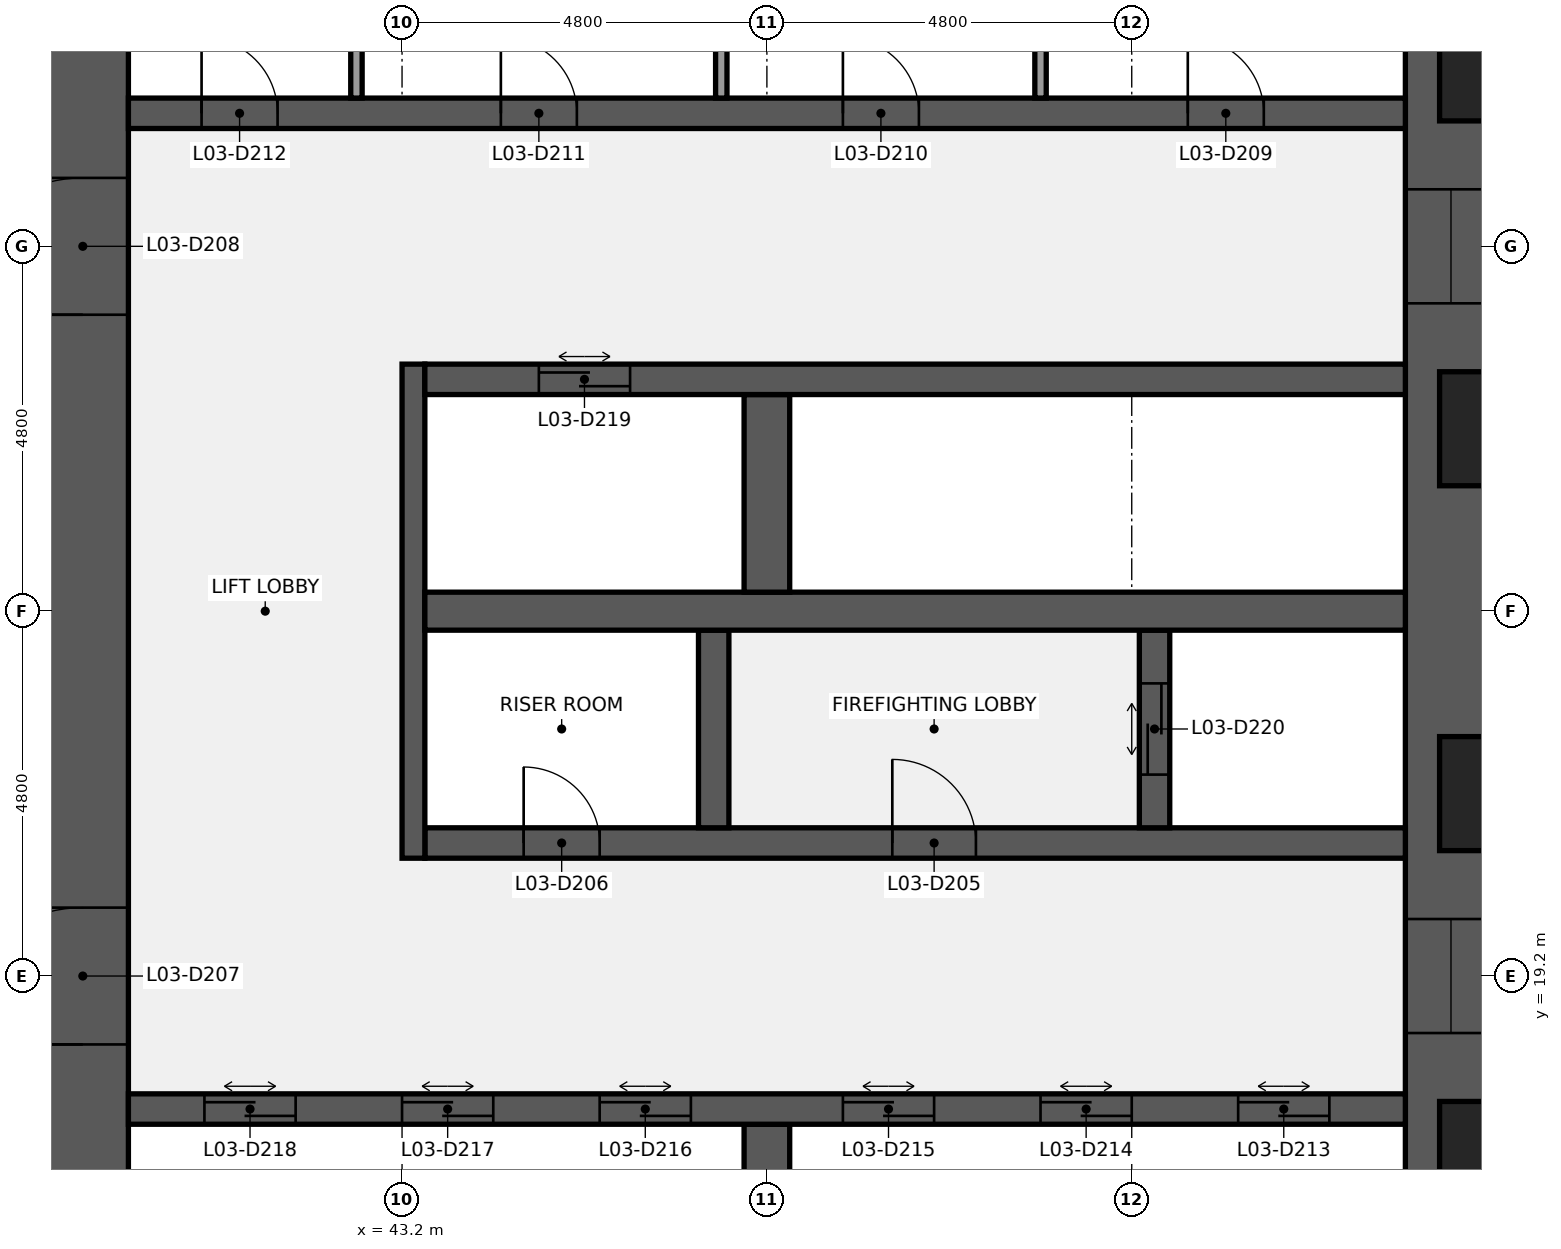
"""IFC4 building model, lengths in metres.
Left out: names, types, materials, properties, quantities, classifications, styles, units other than length and angle.
Written with IfcOpenShell. Run it as: python <this file> out.ifc"""

import sys

from ifc_helpers import new_model, si_unit, direction, frame, frame_2d, origin, place, context, subcontext, project, spatial, rectangle, extrude, element, fill, save


model = new_model("IFC4")
c1 = context("Model", 3, precision=1e-05, world=origin(), true_north=direction((0.0, 1.0)))
c2 = subcontext(c1, "Body", "Model", "MODEL_VIEW")
j1 = project(units=[si_unit("LENGTHUNIT", "METRE"), si_unit("PLANEANGLEUNIT", "RADIAN")], contexts=[c1])
p1 = place(None, origin())
s1 = spatial("IfcSite", under=j1, at=p1, CompositionType="ELEMENT")
p2 = place(p1, origin())
s2 = spatial("IfcBuilding", under=s1, at=p2, CompositionType="ELEMENT")
p3 = place(p2, frame((0.0, 0.0, 21.4)))
s3 = spatial("IfcBuildingStorey", under=s2, at=p3, CompositionType="ELEMENT", Elevation=21.4)
p4 = place(p3, frame((57.0, 38.4, 0.0), z_axis=(0.0, 0.0, 1.0), x_axis=(0.0, -1.0, 0.0)))
e1 = element("IfcWall", 1, at=p4, inside=s3, PredefinedType="SHEAR", context=c2, shape_type="SweptSolid", body=[
    extrude(rectangle(XDim=28.8, YDim=1.2, at=frame_2d((14.4, 0.0))), origin(), (0.0, 0.0, 1.0), 4.24),
])
p5 = place(p4, frame((18.45, 0.0, 0.9)))
e2 = element("IfcOpeningElement", 2, at=p5, cuts=e1, PredefinedType="OPENING", context=c2, shape_type="SweptSolid", body=[
    extrude(rectangle(XDim=1.5, YDim=1.5, at=frame_2d((0.75, 0.75))), frame((0.0, 0.61, 0.0), z_axis=(0.0, -1.0, 0.0), x_axis=(1.0, 0.0, 0.0)), (0.0, 0.0, 1.0), 1.22),
])
p6 = place(p4, frame((8.85, 0.0, 0.9)))
e3 = element("IfcOpeningElement", 3, at=p6, cuts=e1, PredefinedType="OPENING", context=c2, shape_type="SweptSolid", body=[
    extrude(rectangle(XDim=1.5, YDim=1.5, at=frame_2d((0.75, 0.75))), frame((0.0, 0.61, 0.0), z_axis=(0.0, -1.0, 0.0), x_axis=(1.0, 0.0, 0.0)), (0.0, 0.0, 1.0), 1.22),
])
p7 = place(p3, frame((39.0, 9.6, 0.0), z_axis=(0.0, 0.0, 1.0), x_axis=(0.0, 1.0, 0.0)))
e4 = element("IfcWall", 4, at=p7, inside=s3, PredefinedType="SHEAR", context=c2, shape_type="SweptSolid", body=[
    extrude(rectangle(XDim=28.8, YDim=1.2, at=frame_2d((14.4, 0.0))), origin(), (0.0, 0.0, 1.0), 4.24),
])
p8 = place(p7, frame((8.7, 0.0, 0.0)))
e5 = element("IfcOpeningElement", 5, at=p8, cuts=e4, PredefinedType="OPENING", context=c2, shape_type="SweptSolid", body=[
    extrude(rectangle(XDim=1.8, YDim=2.1, at=frame_2d((0.9, 1.05))), frame((0.0, 0.61, 0.0), z_axis=(0.0, -1.0, 0.0), x_axis=(1.0, 0.0, 0.0)), (0.0, 0.0, 1.0), 1.22),
])
p9 = place(p7, frame((18.3, 0.0, 0.0)))
e6 = element("IfcOpeningElement", 6, at=p9, cuts=e4, PredefinedType="OPENING", context=c2, shape_type="SweptSolid", body=[
    extrude(rectangle(XDim=1.8, YDim=2.1, at=frame_2d((0.9, 1.05))), frame((0.0, 0.61, 0.0), z_axis=(0.0, -1.0, 0.0), x_axis=(1.0, 0.0, 0.0)), (0.0, 0.0, 1.0), 1.22),
])
p10 = place(p3, frame((48.0, 14.65, 0.0), z_axis=(0.0, 0.0, 1.0), x_axis=(0.0, 1.0, 0.0)))
e7 = element("IfcWall", 7, at=p10, inside=s3, PredefinedType="SHEAR", context=c2, shape_type="SweptSolid", body=[
    extrude(rectangle(XDim=2.6, YDim=0.6, at=frame_2d((1.3, 0.0))), origin(), (0.0, 0.0, 1.0), 4.24),
])
p11 = place(p3, frame((39.6, 17.45, 0.0), z_axis=(0.0, 0.0, 1.0), x_axis=(1.0, 0.0, 0.0)))
e8 = element("IfcWall", 8, at=p11, inside=s3, PredefinedType="SHEAR", context=c2, shape_type="SweptSolid", body=[
    extrude(rectangle(XDim=16.8, YDim=0.4, at=frame_2d((8.4, 0.0))), origin(), (0.0, 0.0, 1.0), 4.24),
])
p12 = place(p11, frame((14.6, 0.0, 0.0)))
e9 = element("IfcOpeningElement", 9, at=p12, cuts=e8, PredefinedType="OPENING", context=c2, shape_type="SweptSolid", body=[
    extrude(rectangle(XDim=1.2, YDim=2.1, at=frame_2d((0.6, 1.05))), frame((0.0, 0.21, 0.0), z_axis=(0.0, -1.0, 0.0), x_axis=(1.0, 0.0, 0.0)), (0.0, 0.0, 1.0), 0.42),
])
p13 = place(p11, frame((12.0, 0.0, 0.0)))
e10 = element("IfcOpeningElement", 10, at=p13, cuts=e8, PredefinedType="OPENING", context=c2, shape_type="SweptSolid", body=[
    extrude(rectangle(XDim=1.2, YDim=2.1, at=frame_2d((0.6, 1.05))), frame((0.0, 0.21, 0.0), z_axis=(0.0, -1.0, 0.0), x_axis=(1.0, 0.0, 0.0)), (0.0, 0.0, 1.0), 0.42),
])
p14 = place(p11, frame((9.4, 0.0, 0.0)))
e11 = element("IfcOpeningElement", 11, at=p14, cuts=e8, PredefinedType="OPENING", context=c2, shape_type="SweptSolid", body=[
    extrude(rectangle(XDim=1.2, YDim=2.1, at=frame_2d((0.6, 1.05))), frame((0.0, 0.21, 0.0), z_axis=(0.0, -1.0, 0.0), x_axis=(1.0, 0.0, 0.0)), (0.0, 0.0, 1.0), 0.42),
])
p15 = place(p11, frame((6.2, 0.0, 0.0)))
e12 = element("IfcOpeningElement", 12, at=p15, cuts=e8, PredefinedType="OPENING", context=c2, shape_type="SweptSolid", body=[
    extrude(rectangle(XDim=1.2, YDim=2.1, at=frame_2d((0.6, 1.05))), frame((0.0, 0.21, 0.0), z_axis=(0.0, -1.0, 0.0), x_axis=(1.0, 0.0, 0.0)), (0.0, 0.0, 1.0), 0.42),
])
p16 = place(p11, frame((3.6, 0.0, 0.0)))
e13 = element("IfcOpeningElement", 13, at=p16, cuts=e8, PredefinedType="OPENING", context=c2, shape_type="SweptSolid", body=[
    extrude(rectangle(XDim=1.2, YDim=2.1, at=frame_2d((0.6, 1.05))), frame((0.0, 0.21, 0.0), z_axis=(0.0, -1.0, 0.0), x_axis=(1.0, 0.0, 0.0)), (0.0, 0.0, 1.0), 0.42),
])
p17 = place(p11, frame((1.0, 0.0, 0.0)))
e14 = element("IfcOpeningElement", 14, at=p17, cuts=e8, PredefinedType="OPENING", context=c2, shape_type="SweptSolid", body=[
    extrude(rectangle(XDim=1.2, YDim=2.1, at=frame_2d((0.6, 1.05))), frame((0.0, 0.21, 0.0), z_axis=(0.0, -1.0, 0.0), x_axis=(1.0, 0.0, 0.0)), (0.0, 0.0, 1.0), 0.42),
])
p18 = place(p3, frame((43.5, 20.95, 0.0), z_axis=(0.0, 0.0, 1.0), x_axis=(1.0, 0.0, 0.0)))
e15 = element("IfcWall", 15, at=p18, inside=s3, PredefinedType="SHEAR", context=c2, shape_type="SweptSolid", body=[
    extrude(rectangle(XDim=12.9, YDim=0.4, at=frame_2d((6.45, 0.0))), origin(), (0.0, 0.0, 1.0), 4.24),
])
p19 = place(p18, frame((6.15, 0.0, 0.0)))
e16 = element("IfcOpeningElement", 16, at=p19, cuts=e15, PredefinedType="OPENING", context=c2, shape_type="SweptSolid", body=[
    extrude(rectangle(XDim=1.1, YDim=2.1, at=frame_2d((0.55, 1.05))), frame((0.0, 0.21, 0.0), z_axis=(0.0, -1.0, 0.0), x_axis=(1.0, 0.0, 0.0)), (0.0, 0.0, 1.0), 0.42),
])
p20 = place(p18, frame((1.3, 0.0, 0.0)))
e17 = element("IfcOpeningElement", 17, at=p20, cuts=e15, PredefinedType="OPENING", context=c2, shape_type="SweptSolid", body=[
    extrude(rectangle(XDim=1.0, YDim=2.1, at=frame_2d((0.5, 1.05))), frame((0.0, 0.21, 0.0), z_axis=(0.0, -1.0, 0.0), x_axis=(1.0, 0.0, 0.0)), (0.0, 0.0, 1.0), 0.42),
])
p21 = place(p3, frame((43.35, 20.75, 0.0), z_axis=(0.0, 0.0, 1.0), x_axis=(0.0, 1.0, 0.0)))
e18 = element("IfcWall", 18, at=p21, inside=s3, PredefinedType="SHEAR", context=c2, shape_type="SweptSolid", body=[
    extrude(rectangle(XDim=6.5, YDim=0.3, at=frame_2d((3.25, 0.0))), origin(), (0.0, 0.0, 1.0), 4.24),
])
p22 = place(p3, frame((53.1, 21.15, 0.0), z_axis=(0.0, 0.0, 1.0), x_axis=(0.0, 1.0, 0.0)))
e19 = element("IfcWall", 19, at=p22, inside=s3, PredefinedType="SHEAR", context=c2, shape_type="SweptSolid", body=[
    extrude(rectangle(XDim=2.6, YDim=0.4, at=frame_2d((1.3, 0.0))), origin(), (0.0, 0.0, 1.0), 4.24),
])
p23 = place(p22, frame((0.7, 0.0, 0.0)))
e20 = element("IfcOpeningElement", 20, at=p23, cuts=e19, PredefinedType="OPENING", context=c2, shape_type="SweptSolid", body=[
    extrude(rectangle(XDim=1.2, YDim=2.1, at=frame_2d((0.6, 1.05))), frame((0.0, 0.21, 0.0), z_axis=(0.0, -1.0, 0.0), x_axis=(1.0, 0.0, 0.0)), (0.0, 0.0, 1.0), 0.42),
])
p24 = place(p3, frame((47.3, 21.15, 0.0), z_axis=(0.0, 0.0, 1.0), x_axis=(0.0, 1.0, 0.0)))
e21 = element("IfcWall", 21, at=p24, inside=s3, PredefinedType="SHEAR", context=c2, shape_type="SweptSolid", body=[
    extrude(rectangle(XDim=2.6, YDim=0.4, at=frame_2d((1.3, 0.0))), origin(), (0.0, 0.0, 1.0), 4.24),
])
p25 = place(p3, frame((43.5, 24.0, 0.0), z_axis=(0.0, 0.0, 1.0), x_axis=(1.0, 0.0, 0.0)))
e22 = element("IfcWall", 22, at=p25, inside=s3, PredefinedType="SHEAR", context=c2, shape_type="SweptSolid", body=[
    extrude(rectangle(XDim=12.9, YDim=0.5, at=frame_2d((6.45, 0.0))), origin(), (0.0, 0.0, 1.0), 4.24),
])
p26 = place(p3, frame((48.0, 24.25, 0.0), z_axis=(0.0, 0.0, 1.0), x_axis=(0.0, 1.0, 0.0)))
e23 = element("IfcWall", 23, at=p26, inside=s3, PredefinedType="SHEAR", context=c2, shape_type="SweptSolid", body=[
    extrude(rectangle(XDim=2.6, YDim=0.6, at=frame_2d((1.3, 0.0))), origin(), (0.0, 0.0, 1.0), 4.24),
])
p27 = place(p3, frame((43.5, 27.05, 0.0), z_axis=(0.0, 0.0, 1.0), x_axis=(1.0, 0.0, 0.0)))
e24 = element("IfcWall", 24, at=p27, inside=s3, PredefinedType="SHEAR", context=c2, shape_type="SweptSolid", body=[
    extrude(rectangle(XDim=12.9, YDim=0.4, at=frame_2d((6.45, 0.0))), origin(), (0.0, 0.0, 1.0), 4.24),
])
p28 = place(p27, frame((1.5, 0.0, 0.0)))
e25 = element("IfcOpeningElement", 25, at=p28, cuts=e24, PredefinedType="OPENING", context=c2, shape_type="SweptSolid", body=[
    extrude(rectangle(XDim=1.2, YDim=2.1, at=frame_2d((0.6, 1.05))), frame((0.0, 0.21, 0.0), z_axis=(0.0, -1.0, 0.0), x_axis=(1.0, 0.0, 0.0)), (0.0, 0.0, 1.0), 0.42),
])
p29 = place(p3, frame((39.6, 30.55, 0.0), z_axis=(0.0, 0.0, 1.0), x_axis=(1.0, 0.0, 0.0)))
e26 = element("IfcWall", 26, at=p29, inside=s3, PredefinedType="SHEAR", context=c2, shape_type="SweptSolid", body=[
    extrude(rectangle(XDim=16.8, YDim=0.4, at=frame_2d((8.4, 0.0))), origin(), (0.0, 0.0, 1.0), 4.24),
])
p30 = place(p29, frame((13.938, 0.0, 0.0)))
e27 = element("IfcOpeningElement", 27, at=p30, cuts=e26, PredefinedType="OPENING", context=c2, shape_type="SweptSolid", body=[
    extrude(rectangle(XDim=1.0, YDim=2.1, at=frame_2d((0.5, 1.05))), frame((0.0, 0.21, 0.0), z_axis=(0.0, -1.0, 0.0), x_axis=(1.0, 0.0, 0.0)), (0.0, 0.0, 1.0), 0.42),
])
p31 = place(p29, frame((9.4, 0.0, 0.0)))
e28 = element("IfcOpeningElement", 28, at=p31, cuts=e26, PredefinedType="OPENING", context=c2, shape_type="SweptSolid", body=[
    extrude(rectangle(XDim=1.0, YDim=2.1, at=frame_2d((0.5, 1.05))), frame((0.0, 0.21, 0.0), z_axis=(0.0, -1.0, 0.0), x_axis=(1.0, 0.0, 0.0)), (0.0, 0.0, 1.0), 0.42),
])
p32 = place(p29, frame((4.9, 0.0, 0.0)))
e29 = element("IfcOpeningElement", 29, at=p32, cuts=e26, PredefinedType="OPENING", context=c2, shape_type="SweptSolid", body=[
    extrude(rectangle(XDim=1.0, YDim=2.1, at=frame_2d((0.5, 1.05))), frame((0.0, 0.21, 0.0), z_axis=(0.0, -1.0, 0.0), x_axis=(1.0, 0.0, 0.0)), (0.0, 0.0, 1.0), 0.42),
])
p33 = place(p29, frame((0.962, 0.0, 0.0)))
e30 = element("IfcOpeningElement", 30, at=p33, cuts=e26, PredefinedType="OPENING", context=c2, shape_type="SweptSolid", body=[
    extrude(rectangle(XDim=1.0, YDim=2.1, at=frame_2d((0.5, 1.05))), frame((0.0, 0.21, 0.0), z_axis=(0.0, -1.0, 0.0), x_axis=(1.0, 0.0, 0.0)), (0.0, 0.0, 1.0), 0.42),
])
for number, where, z_axis, x_axis in (
    (31, (51.6, 30.75, 0.0), (0.0, 0.0, 1.0), (0.0, 1.0, 0.0)),
    (32, (47.4, 30.75, 0.0), (0.0, 0.0, 1.0), (0.0, 1.0, 0.0)),
    (33, (42.6, 30.75, 0.0), (0.0, 0.0, 1.0), (0.0, 1.0, 0.0)),
):
    element("IfcWall", number, at=place(p3, frame(where, z_axis=z_axis, x_axis=x_axis)), inside=s3, PredefinedType="PARTITIONING", context=c2, shape_type="SweptSolid", body=[
        extrude(rectangle(XDim=2.6, YDim=0.15, at=frame_2d((1.3, 0.0))), origin(), (0.0, 0.0, 1.0), 4.24),
    ])
p34 = place(p19, origin())
e34 = element("IfcDoor", 34, at=p34, inside=s3, OperationType="SINGLE_SWING_LEFT", PredefinedType="DOOR", context=c2, shape_type="SweptSolid", body=[
    extrude(rectangle(XDim=1.1, YDim=2.1, at=frame_2d((0.55, 1.05))), frame((0.0, 0.025, 0.0), z_axis=(0.0, -1.0, 0.0), x_axis=(1.0, 0.0, 0.0)), (0.0, 0.0, 1.0), 0.05),
])
fill(e16, e34)
p35 = place(p20, origin())
e35 = element("IfcDoor", 35, at=p35, inside=s3, OperationType="SINGLE_SWING_LEFT", PredefinedType="DOOR", context=c2, shape_type="SweptSolid", body=[
    extrude(rectangle(XDim=1.0, YDim=2.1, at=frame_2d((0.5, 1.05))), frame((0.0, 0.025, 0.0), z_axis=(0.0, -1.0, 0.0), x_axis=(1.0, 0.0, 0.0)), (0.0, 0.0, 1.0), 0.05),
])
fill(e17, e35)
p36 = place(p8, origin())
e36 = element("IfcDoor", 36, at=p36, inside=s3, OperationType="DOUBLE_DOOR_SINGLE_SWING", PredefinedType="DOOR", context=c2, shape_type="SweptSolid", body=[
    extrude(rectangle(XDim=1.8, YDim=2.1, at=frame_2d((0.9, 1.05))), frame((0.0, 0.025, 0.0), z_axis=(0.0, -1.0, 0.0), x_axis=(1.0, 0.0, 0.0)), (0.0, 0.0, 1.0), 0.05),
])
fill(e5, e36)
p37 = place(p9, origin())
e37 = element("IfcDoor", 37, at=p37, inside=s3, OperationType="DOUBLE_DOOR_SINGLE_SWING", PredefinedType="DOOR", context=c2, shape_type="SweptSolid", body=[
    extrude(rectangle(XDim=1.8, YDim=2.1, at=frame_2d((0.9, 1.05))), frame((0.0, 0.025, 0.0), z_axis=(0.0, -1.0, 0.0), x_axis=(1.0, 0.0, 0.0)), (0.0, 0.0, 1.0), 0.05),
])
fill(e6, e37)
p38 = place(p30, origin())
e38 = element("IfcDoor", 38, at=p38, inside=s3, OperationType="SINGLE_SWING_LEFT", PredefinedType="DOOR", context=c2, shape_type="SweptSolid", body=[
    extrude(rectangle(XDim=1.0, YDim=2.1, at=frame_2d((0.5, 1.05))), frame((0.0, 0.025, 0.0), z_axis=(0.0, -1.0, 0.0), x_axis=(1.0, 0.0, 0.0)), (0.0, 0.0, 1.0), 0.05),
])
fill(e27, e38)
p39 = place(p31, origin())
e39 = element("IfcDoor", 39, at=p39, inside=s3, OperationType="SINGLE_SWING_LEFT", PredefinedType="DOOR", context=c2, shape_type="SweptSolid", body=[
    extrude(rectangle(XDim=1.0, YDim=2.1, at=frame_2d((0.5, 1.05))), frame((0.0, 0.025, 0.0), z_axis=(0.0, -1.0, 0.0), x_axis=(1.0, 0.0, 0.0)), (0.0, 0.0, 1.0), 0.05),
])
fill(e28, e39)
p40 = place(p32, origin())
e40 = element("IfcDoor", 40, at=p40, inside=s3, OperationType="SINGLE_SWING_LEFT", PredefinedType="DOOR", context=c2, shape_type="SweptSolid", body=[
    extrude(rectangle(XDim=1.0, YDim=2.1, at=frame_2d((0.5, 1.05))), frame((0.0, 0.025, 0.0), z_axis=(0.0, -1.0, 0.0), x_axis=(1.0, 0.0, 0.0)), (0.0, 0.0, 1.0), 0.05),
])
fill(e29, e40)
p41 = place(p33, origin())
e41 = element("IfcDoor", 41, at=p41, inside=s3, OperationType="SINGLE_SWING_LEFT", PredefinedType="DOOR", context=c2, shape_type="SweptSolid", body=[
    extrude(rectangle(XDim=1.0, YDim=2.1, at=frame_2d((0.5, 1.05))), frame((0.0, 0.025, 0.0), z_axis=(0.0, -1.0, 0.0), x_axis=(1.0, 0.0, 0.0)), (0.0, 0.0, 1.0), 0.05),
])
fill(e30, e41)
p42 = place(p12, origin())
e42 = element("IfcDoor", 42, at=p42, inside=s3, OperationType="DOUBLE_DOOR_SLIDING", PredefinedType="DOOR", context=c2, shape_type="SweptSolid", body=[
    extrude(rectangle(XDim=1.2, YDim=2.1, at=frame_2d((0.6, 1.05))), frame((0.0, 0.025, 0.0), z_axis=(0.0, -1.0, 0.0), x_axis=(1.0, 0.0, 0.0)), (0.0, 0.0, 1.0), 0.05),
])
fill(e9, e42)
p43 = place(p13, origin())
e43 = element("IfcDoor", 43, at=p43, inside=s3, OperationType="DOUBLE_DOOR_SLIDING", PredefinedType="DOOR", context=c2, shape_type="SweptSolid", body=[
    extrude(rectangle(XDim=1.2, YDim=2.1, at=frame_2d((0.6, 1.05))), frame((0.0, 0.025, 0.0), z_axis=(0.0, -1.0, 0.0), x_axis=(1.0, 0.0, 0.0)), (0.0, 0.0, 1.0), 0.05),
])
fill(e10, e43)
p44 = place(p14, origin())
e44 = element("IfcDoor", 44, at=p44, inside=s3, OperationType="DOUBLE_DOOR_SLIDING", PredefinedType="DOOR", context=c2, shape_type="SweptSolid", body=[
    extrude(rectangle(XDim=1.2, YDim=2.1, at=frame_2d((0.6, 1.05))), frame((0.0, 0.025, 0.0), z_axis=(0.0, -1.0, 0.0), x_axis=(1.0, 0.0, 0.0)), (0.0, 0.0, 1.0), 0.05),
])
fill(e11, e44)
p45 = place(p15, origin())
e45 = element("IfcDoor", 45, at=p45, inside=s3, OperationType="DOUBLE_DOOR_SLIDING", PredefinedType="DOOR", context=c2, shape_type="SweptSolid", body=[
    extrude(rectangle(XDim=1.2, YDim=2.1, at=frame_2d((0.6, 1.05))), frame((0.0, 0.025, 0.0), z_axis=(0.0, -1.0, 0.0), x_axis=(1.0, 0.0, 0.0)), (0.0, 0.0, 1.0), 0.05),
])
fill(e12, e45)
p46 = place(p16, origin())
e46 = element("IfcDoor", 46, at=p46, inside=s3, OperationType="DOUBLE_DOOR_SLIDING", PredefinedType="DOOR", context=c2, shape_type="SweptSolid", body=[
    extrude(rectangle(XDim=1.2, YDim=2.1, at=frame_2d((0.6, 1.05))), frame((0.0, 0.025, 0.0), z_axis=(0.0, -1.0, 0.0), x_axis=(1.0, 0.0, 0.0)), (0.0, 0.0, 1.0), 0.05),
])
fill(e13, e46)
p47 = place(p17, origin())
e47 = element("IfcDoor", 47, at=p47, inside=s3, OperationType="DOUBLE_DOOR_SLIDING", PredefinedType="DOOR", context=c2, shape_type="SweptSolid", body=[
    extrude(rectangle(XDim=1.2, YDim=2.1, at=frame_2d((0.6, 1.05))), frame((0.0, 0.025, 0.0), z_axis=(0.0, -1.0, 0.0), x_axis=(1.0, 0.0, 0.0)), (0.0, 0.0, 1.0), 0.05),
])
fill(e14, e47)
p48 = place(p28, origin())
e48 = element("IfcDoor", 48, at=p48, inside=s3, OperationType="DOUBLE_DOOR_SLIDING", PredefinedType="DOOR", context=c2, shape_type="SweptSolid", body=[
    extrude(rectangle(XDim=1.2, YDim=2.1, at=frame_2d((0.6, 1.05))), frame((0.0, 0.025, 0.0), z_axis=(0.0, -1.0, 0.0), x_axis=(1.0, 0.0, 0.0)), (0.0, 0.0, 1.0), 0.05),
])
fill(e25, e48)
p49 = place(p23, origin())
e49 = element("IfcDoor", 49, at=p49, inside=s3, OperationType="DOUBLE_DOOR_SLIDING", PredefinedType="DOOR", context=c2, shape_type="SweptSolid", body=[
    extrude(rectangle(XDim=1.2, YDim=2.1, at=frame_2d((0.6, 1.05))), frame((0.0, 0.025, 0.0), z_axis=(0.0, -1.0, 0.0), x_axis=(1.0, 0.0, 0.0)), (0.0, 0.0, 1.0), 0.05),
])
fill(e20, e49)
p50 = place(p5, origin())
e50 = element("IfcWindow", 50, at=p50, inside=s3, PartitioningType="SINGLE_PANEL", PredefinedType="WINDOW", context=c2, shape_type="SweptSolid", body=[
    extrude(rectangle(XDim=1.5, YDim=1.5, at=frame_2d((0.75, 0.75))), frame((0.0, 0.03, 0.0), z_axis=(0.0, -1.0, 0.0), x_axis=(1.0, 0.0, 0.0)), (0.0, 0.0, 1.0), 0.06),
])
fill(e2, e50)
p51 = place(p6, origin())
e51 = element("IfcWindow", 51, at=p51, inside=s3, PartitioningType="SINGLE_PANEL", PredefinedType="WINDOW", context=c2, shape_type="SweptSolid", body=[
    extrude(rectangle(XDim=1.5, YDim=1.5, at=frame_2d((0.75, 0.75))), frame((0.0, 0.03, 0.0), z_axis=(0.0, -1.0, 0.0), x_axis=(1.0, 0.0, 0.0)), (0.0, 0.0, 1.0), 0.06),
])
fill(e3, e51)
save(model, sys.argv[1])
